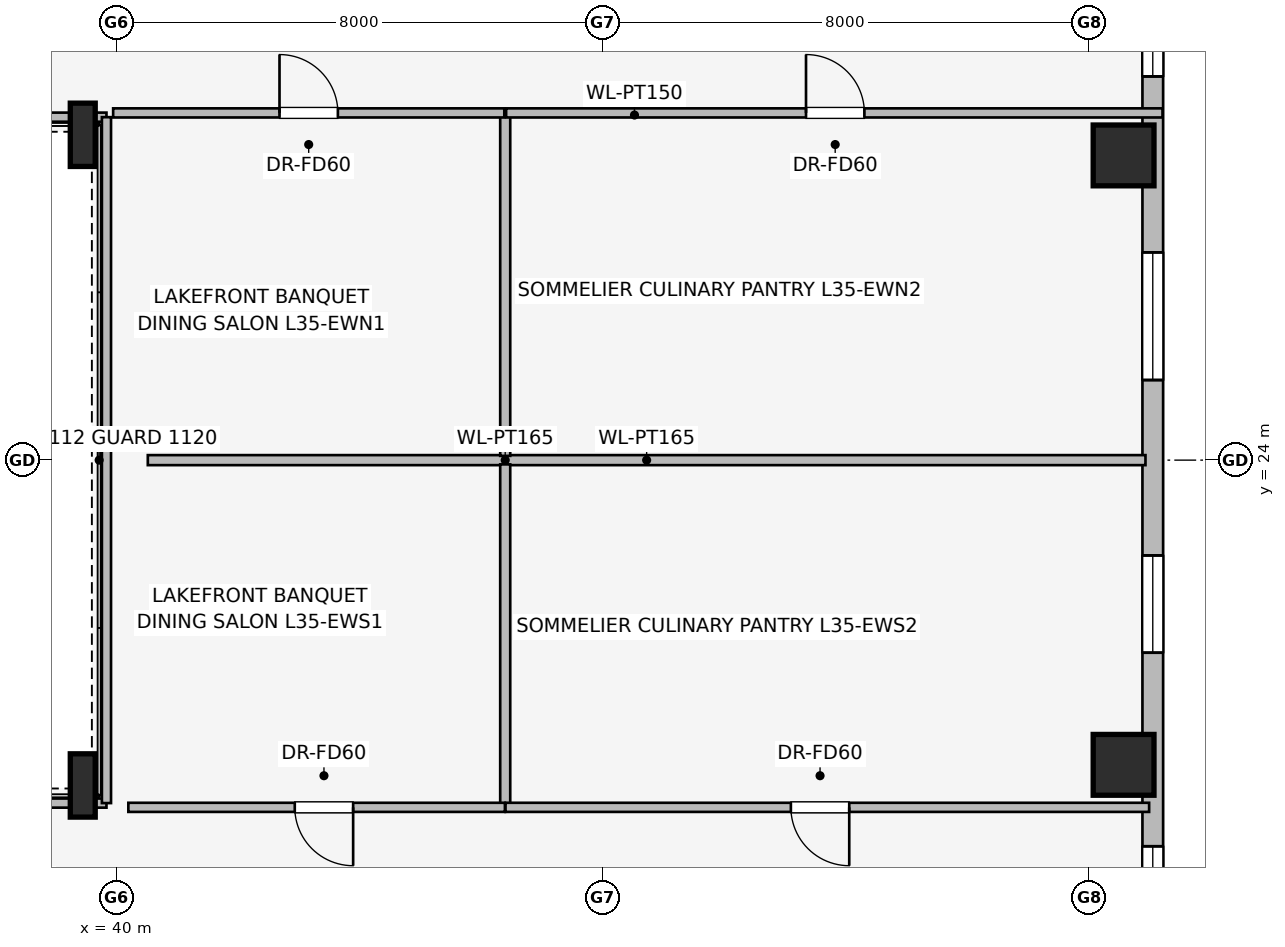
"""IFC4 building model, lengths in metres.
Left out: names, types, materials, properties, quantities, classifications, styles, units other than length and angle.
Written with IfcOpenShell. Run it as: python <this file> out.ifc"""

import sys

from ifc_helpers import new_model, si_unit, direction, frame, frame_2d, origin, origin_2d, place, context, subcontext, project, spatial, rectangle, i_section, extrude, element, fill, save


model = new_model("IFC4")
c1 = context("Model", 3, precision=1e-05, world=origin(), true_north=direction((0.0, 1.0)))
c2 = subcontext(c1, "Body", "Model", "MODEL_VIEW")
j1 = project(units=[si_unit("LENGTHUNIT", "METRE"), si_unit("PLANEANGLEUNIT", "RADIAN")], contexts=[c1])
p1 = place(None, origin())
s1 = spatial("IfcSite", under=j1, at=p1, CompositionType="ELEMENT")
p2 = place(p1, origin())
s2 = spatial("IfcBuilding", under=s1, at=p2, CompositionType="ELEMENT")
p3 = place(p2, frame((0.0, 0.0, 132.6)))
s3 = spatial("IfcBuildingStorey", under=s2, at=p3, CompositionType="ELEMENT", Elevation=132.6)
for number, where, z_axis, x_axis in (
    (1, (56.568, 18.989, 0.0), (0.0, 0.0, 1.0), (1.0, 0.0, 0.0)),
    (2, (56.568, 29.011, 0.0), (0.0, 0.0, 1.0), (1.0, 0.0, 0.0)),
):
    element("IfcColumn", number, at=place(p3, frame(where, z_axis=z_axis, x_axis=x_axis)), inside=s3, PredefinedType="COLUMN", context=c2, shape_type="SweptSolid", body=[
        extrude(rectangle(XDim=1.0, YDim=1.0, at=origin_2d()), origin(), (0.0, 0.0, 1.0), 3.45),
    ])
for number, where, z_axis, x_axis in (
    (3, (39.45, 18.65, 0.0), (0.0, 0.0, 1.0), (1.0, 0.0, 0.0)),
    (4, (39.45, 29.35, 0.0), (0.0, 0.0, 1.0), (1.0, 0.0, 0.0)),
):
    element("IfcColumn", number, at=place(p3, frame(where, z_axis=z_axis, x_axis=x_axis)), inside=s3, PredefinedType="COLUMN", context=c2, shape_type="SweptSolid", body=[
        extrude(i_section(OverallWidth=0.41, OverallDepth=1.041, WebThickness=0.031, FlangeThickness=0.056, at=origin_2d()), origin(), (0.0, 0.0, 1.0), 3.45),
    ])
p4 = place(p3, frame((57.048, 32.352, 0.0), z_axis=(0.0, 0.0, 1.0), x_axis=(0.0, -1.0, 0.0)))
e5 = element("IfcWall", 5, at=p4, inside=s3, PredefinedType="STANDARD", context=c2, shape_type="SweptSolid", body=[
    extrude(rectangle(XDim=16.704, YDim=0.34, at=frame_2d((8.352, 0.0))), origin(), (0.0, 0.0, 1.0), 3.19),
])
p5 = place(p4, frame((0.992, 0.0, 0.75)))
e6 = element("IfcOpeningElement", 6, at=p5, cuts=e5, PredefinedType="OPENING", context=c2, shape_type="SweptSolid", body=[
    extrude(rectangle(XDim=1.05, YDim=1.4, at=frame_2d((0.525, 0.7))), frame((0.0, 0.18, 0.0), z_axis=(0.0, -1.0, 0.0), x_axis=(1.0, 0.0, 0.0)), (0.0, 0.0, 1.0), 0.36),
])
p6 = place(p4, frame((4.935, 0.0, 0.75)))
e7 = element("IfcOpeningElement", 7, at=p6, cuts=e5, PredefinedType="OPENING", context=c2, shape_type="SweptSolid", body=[
    extrude(rectangle(XDim=2.1, YDim=1.5, at=frame_2d((1.05, 0.75))), frame((0.0, 0.18, 0.0), z_axis=(0.0, -1.0, 0.0), x_axis=(1.0, 0.0, 0.0)), (0.0, 0.0, 1.0), 0.36),
])
p7 = place(p4, frame((9.919, 0.0, 0.75)))
e8 = element("IfcOpeningElement", 8, at=p7, cuts=e5, PredefinedType="OPENING", context=c2, shape_type="SweptSolid", body=[
    extrude(rectangle(XDim=1.6, YDim=1.55, at=frame_2d((0.8, 0.775))), frame((0.0, 0.18, 0.0), z_axis=(0.0, -1.0, 0.0), x_axis=(1.0, 0.0, 0.0)), (0.0, 0.0, 1.0), 0.36),
])
p8 = place(p4, frame((14.702, 0.0, 0.75)))
e9 = element("IfcOpeningElement", 9, at=p8, cuts=e5, PredefinedType="OPENING", context=c2, shape_type="SweptSolid", body=[
    extrude(rectangle(XDim=1.05, YDim=1.4, at=frame_2d((0.525, 0.7))), frame((0.0, 0.18, 0.0), z_axis=(0.0, -1.0, 0.0), x_axis=(1.0, 0.0, 0.0)), (0.0, 0.0, 1.0), 0.36),
])
p9 = place(p3, frame((27.675, 18.36, 0.0), z_axis=(0.0, 0.0, 1.0), x_axis=(1.0, 0.0, 0.0)))
e10 = element("IfcWall", 10, at=p9, inside=s3, PredefinedType="PARTITIONING", context=c2, shape_type="SweptSolid", body=[
    extrude(rectangle(XDim=12.165, YDim=0.15, at=frame_2d((6.083, 0.0))), origin(), (0.0, 0.0, 1.0), 2.331),
])
p10 = place(p3, frame((39.84, 29.64, 0.0), z_axis=(0.0, 0.0, 1.0), x_axis=(-1.0, 0.0, 0.0)))
e11 = element("IfcWall", 11, at=p10, inside=s3, PredefinedType="PARTITIONING", context=c2, shape_type="SweptSolid", body=[
    extrude(rectangle(XDim=12.2, YDim=0.15, at=frame_2d((6.1, 0.0))), origin(), (0.0, 0.0, 1.0), 2.331),
])
p11 = place(p3, frame((39.84, 18.36, 0.0), z_axis=(0.0, 0.0, 1.0), x_axis=(0.0, 1.0, 0.0)))
e12 = element("IfcWall", 12, at=p11, inside=s3, PredefinedType="PARTITIONING", context=c2, shape_type="SweptSolid", body=[
    extrude(rectangle(XDim=11.28, YDim=0.15, at=frame_2d((5.64, 0.0))), origin(), (0.0, 0.0, 1.0), 3.19),
])
p12 = place(p3, frame((40.52, 24.0, 0.0), z_axis=(0.0, 0.0, 1.0), x_axis=(1.0, 0.0, 0.0)))
e13 = element("IfcWall", 13, at=p12, inside=s3, PredefinedType="PARTITIONING", context=c2, shape_type="SweptSolid", body=[
    extrude(rectangle(XDim=16.408, YDim=0.165, at=frame_2d((8.204, 0.0))), origin(), (0.0, 0.0, 1.0), 3.19),
])
p13 = place(p3, frame((46.398, 24.07, 0.0), z_axis=(0.0, 0.0, 1.0), x_axis=(0.0, 1.0, 0.0)))
e14 = element("IfcWall", 14, at=p13, inside=s3, PredefinedType="PARTITIONING", context=c2, shape_type="SweptSolid", body=[
    extrude(rectangle(XDim=5.64, YDim=0.165, at=frame_2d((2.82, 0.0))), origin(), (0.0, 0.0, 1.0), 2.733),
])
p14 = place(p3, frame((39.95, 29.71, 0.0), z_axis=(0.0, 0.0, 1.0), x_axis=(1.0, 0.0, 0.0)))
e15 = element("IfcWall", 15, at=p14, inside=s3, PredefinedType="PARTITIONING", context=c2, shape_type="SweptSolid", body=[
    extrude(rectangle(XDim=6.433, YDim=0.15, at=frame_2d((3.217, 0.0))), origin(), (0.0, 0.0, 1.0), 3.19),
])
p15 = place(p14, frame((2.736, 0.0, 0.0)))
e16 = element("IfcOpeningElement", 16, at=p15, cuts=e15, PredefinedType="OPENING", context=c2, shape_type="SweptSolid", body=[
    extrude(rectangle(XDim=0.96, YDim=2.0, at=frame_2d((0.48, 1.0))), frame((0.0, 0.085, 0.0), z_axis=(0.0, -1.0, 0.0), x_axis=(1.0, 0.0, 0.0)), (0.0, 0.0, 1.0), 0.17),
])
p16 = place(p3, frame((46.413, 29.71, 0.0), z_axis=(0.0, 0.0, 1.0), x_axis=(1.0, 0.0, 0.0)))
e17 = element("IfcWall", 17, at=p16, inside=s3, PredefinedType="PARTITIONING", context=c2, shape_type="SweptSolid", body=[
    extrude(rectangle(XDim=10.795, YDim=0.15, at=frame_2d((5.397, 0.0))), origin(), (0.0, 0.0, 1.0), 3.19),
])
p17 = place(p16, frame((4.932, 0.0, 0.0)))
e18 = element("IfcOpeningElement", 18, at=p17, cuts=e17, PredefinedType="OPENING", context=c2, shape_type="SweptSolid", body=[
    extrude(rectangle(XDim=0.96, YDim=2.0, at=frame_2d((0.48, 1.0))), frame((0.0, 0.085, 0.0), z_axis=(0.0, -1.0, 0.0), x_axis=(1.0, 0.0, 0.0)), (0.0, 0.0, 1.0), 0.17),
])
p18 = place(p3, frame((46.398, 18.29, 0.0), z_axis=(0.0, 0.0, 1.0), x_axis=(0.0, 1.0, 0.0)))
e19 = element("IfcWall", 19, at=p18, inside=s3, PredefinedType="PARTITIONING", context=c2, shape_type="SweptSolid", body=[
    extrude(rectangle(XDim=5.64, YDim=0.165, at=frame_2d((2.82, 0.0))), origin(), (0.0, 0.0, 1.0), 2.733),
])
p19 = place(p3, frame((46.393, 18.29, 0.0), z_axis=(0.0, 0.0, 1.0), x_axis=(-1.0, 0.0, 0.0)))
e20 = element("IfcWall", 20, at=p19, inside=s3, PredefinedType="PARTITIONING", context=c2, shape_type="SweptSolid", body=[
    extrude(rectangle(XDim=6.193, YDim=0.15, at=frame_2d((3.097, 0.0))), origin(), (0.0, 0.0, 1.0), 3.19),
])
p20 = place(p19, frame((2.496, 0.0, 0.0)))
e21 = element("IfcOpeningElement", 21, at=p20, cuts=e20, PredefinedType="OPENING", context=c2, shape_type="SweptSolid", body=[
    extrude(rectangle(XDim=0.96, YDim=2.0, at=frame_2d((0.48, 1.0))), frame((0.0, 0.085, 0.0), z_axis=(0.0, -1.0, 0.0), x_axis=(1.0, 0.0, 0.0)), (0.0, 0.0, 1.0), 0.17),
])
p21 = place(p3, frame((56.988, 18.29, 0.0), z_axis=(0.0, 0.0, 1.0), x_axis=(-1.0, 0.0, 0.0)))
e22 = element("IfcWall", 22, at=p21, inside=s3, PredefinedType="PARTITIONING", context=c2, shape_type="SweptSolid", body=[
    extrude(rectangle(XDim=10.585, YDim=0.15, at=frame_2d((5.292, 0.0))), origin(), (0.0, 0.0, 1.0), 3.19),
])
p22 = place(p21, frame((4.932, 0.0, 0.0)))
e23 = element("IfcOpeningElement", 23, at=p22, cuts=e22, PredefinedType="OPENING", context=c2, shape_type="SweptSolid", body=[
    extrude(rectangle(XDim=0.96, YDim=2.0, at=frame_2d((0.48, 1.0))), frame((0.0, 0.085, 0.0), z_axis=(0.0, -1.0, 0.0), x_axis=(1.0, 0.0, 0.0)), (0.0, 0.0, 1.0), 0.17),
])
p23 = place(p5, origin())
e24 = element("IfcWindow", 24, at=p23, inside=s3, PartitioningType="SINGLE_PANEL", PredefinedType="WINDOW", context=c2, shape_type="SweptSolid", body=[
    extrude(rectangle(XDim=1.05, YDim=1.4, at=frame_2d((0.525, 0.7))), frame((0.0, 0.03, 0.0), z_axis=(0.0, -1.0, 0.0), x_axis=(1.0, 0.0, 0.0)), (0.0, 0.0, 1.0), 0.06),
])
fill(e6, e24)
p24 = place(p6, origin())
e25 = element("IfcWindow", 25, at=p24, inside=s3, PartitioningType="SINGLE_PANEL", PredefinedType="WINDOW", context=c2, shape_type="SweptSolid", body=[
    extrude(rectangle(XDim=2.1, YDim=1.5, at=frame_2d((1.05, 0.75))), frame((0.0, 0.03, 0.0), z_axis=(0.0, -1.0, 0.0), x_axis=(1.0, 0.0, 0.0)), (0.0, 0.0, 1.0), 0.06),
])
fill(e7, e25)
p25 = place(p7, origin())
e26 = element("IfcWindow", 26, at=p25, inside=s3, PartitioningType="SINGLE_PANEL", PredefinedType="WINDOW", context=c2, shape_type="SweptSolid", body=[
    extrude(rectangle(XDim=1.6, YDim=1.55, at=frame_2d((0.8, 0.775))), frame((0.0, 0.03, 0.0), z_axis=(0.0, -1.0, 0.0), x_axis=(1.0, 0.0, 0.0)), (0.0, 0.0, 1.0), 0.06),
])
fill(e8, e26)
p26 = place(p8, origin())
e27 = element("IfcWindow", 27, at=p26, inside=s3, PartitioningType="SINGLE_PANEL", PredefinedType="WINDOW", context=c2, shape_type="SweptSolid", body=[
    extrude(rectangle(XDim=1.05, YDim=1.4, at=frame_2d((0.525, 0.7))), frame((0.0, 0.03, 0.0), z_axis=(0.0, -1.0, 0.0), x_axis=(1.0, 0.0, 0.0)), (0.0, 0.0, 1.0), 0.06),
])
fill(e9, e27)
p27 = place(p15, origin())
e28 = element("IfcDoor", 28, at=p27, inside=s3, OperationType="SINGLE_SWING_LEFT", PredefinedType="DOOR", context=c2, shape_type="SweptSolid", body=[
    extrude(rectangle(XDim=0.96, YDim=2.0, at=frame_2d((0.48, 1.0))), frame((0.0, 0.025, 0.0), z_axis=(0.0, -1.0, 0.0), x_axis=(1.0, 0.0, 0.0)), (0.0, 0.0, 1.0), 0.05),
])
fill(e16, e28)
p28 = place(p17, origin())
e29 = element("IfcDoor", 29, at=p28, inside=s3, OperationType="SINGLE_SWING_LEFT", PredefinedType="DOOR", context=c2, shape_type="SweptSolid", body=[
    extrude(rectangle(XDim=0.96, YDim=2.0, at=frame_2d((0.48, 1.0))), frame((0.0, 0.025, 0.0), z_axis=(0.0, -1.0, 0.0), x_axis=(1.0, 0.0, 0.0)), (0.0, 0.0, 1.0), 0.05),
])
fill(e18, e29)
p29 = place(p20, origin())
e30 = element("IfcDoor", 30, at=p29, inside=s3, OperationType="SINGLE_SWING_LEFT", PredefinedType="DOOR", context=c2, shape_type="SweptSolid", body=[
    extrude(rectangle(XDim=0.96, YDim=2.0, at=frame_2d((0.48, 1.0))), frame((0.0, 0.025, 0.0), z_axis=(0.0, -1.0, 0.0), x_axis=(1.0, 0.0, 0.0)), (0.0, 0.0, 1.0), 0.05),
])
fill(e21, e30)
p30 = place(p22, origin())
e31 = element("IfcDoor", 31, at=p30, inside=s3, OperationType="SINGLE_SWING_LEFT", PredefinedType="DOOR", context=c2, shape_type="SweptSolid", body=[
    extrude(rectangle(XDim=0.96, YDim=2.0, at=frame_2d((0.48, 1.0))), frame((0.0, 0.025, 0.0), z_axis=(0.0, -1.0, 0.0), x_axis=(1.0, 0.0, 0.0)), (0.0, 0.0, 1.0), 0.05),
])
fill(e23, e31)
save(model, sys.argv[1])
